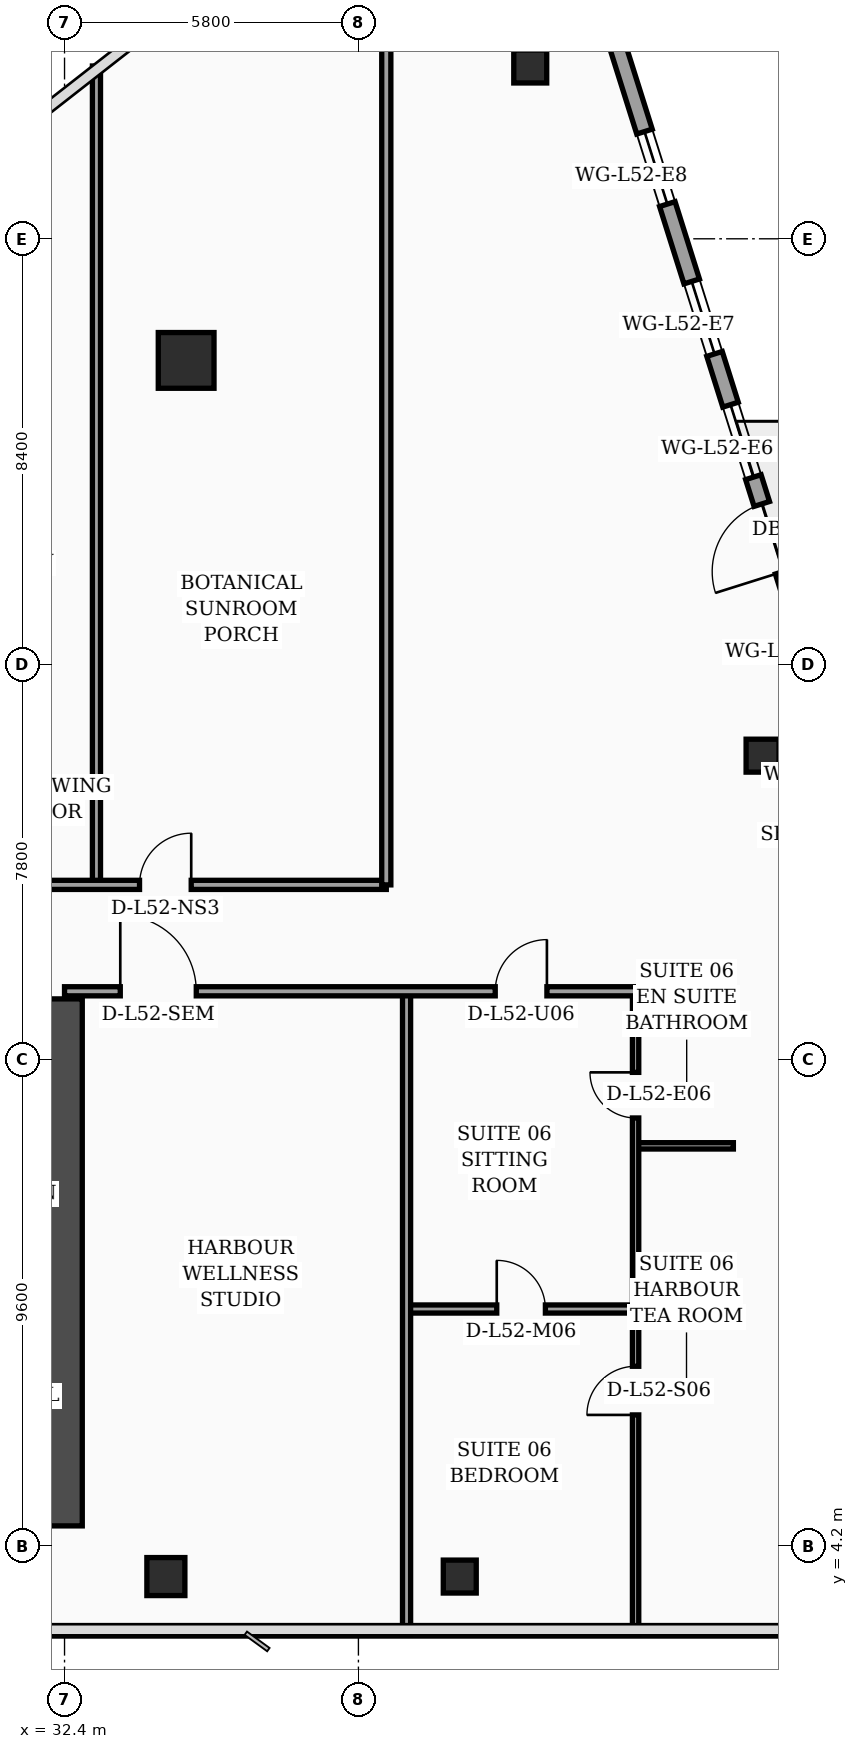
"""IFC4 building model, lengths in metres.
Left out: names, types, materials, properties, quantities, classifications, styles, units other than length and angle.
Written with IfcOpenShell. Run it as: python <this file> out.ifc"""

import sys

from ifc_helpers import new_model, si_unit, direction, frame, frame_2d, origin, origin_2d, place, context, subcontext, project, spatial, rectangle, hollow_rectangle, circle, extrude, element, fill, save


model = new_model("IFC4")
c1 = context("Model", 3, precision=1e-05, world=origin(), true_north=direction((0.0, 1.0)))
c2 = subcontext(c1, "Body", "Model", "MODEL_VIEW")
j1 = project(units=[si_unit("LENGTHUNIT", "METRE"), si_unit("PLANEANGLEUNIT", "RADIAN")], contexts=[c1])
p1 = place(None, origin())
s1 = spatial("IfcSite", under=j1, at=p1, CompositionType="ELEMENT")
p2 = place(p1, origin())
s2 = spatial("IfcBuilding", under=s1, at=p2, CompositionType="ELEMENT")
p3 = place(p2, frame((0.0, 0.0, 211.0)))
s3 = spatial("IfcBuildingStorey", under=s2, at=p3, CompositionType="ELEMENT", Elevation=211.0)
p4 = place(p3, frame((32.4, 4.6, 0.0), z_axis=(0.0, 0.0, 1.0), x_axis=(0.0, 1.0, 0.0)))
e1 = element("IfcWall", 1, at=p4, inside=s3, PredefinedType="SHEAR", context=c2, shape_type="SweptSolid", body=[
    extrude(rectangle(XDim=10.4, YDim=0.7, at=frame_2d((5.2, 0.0))), origin(), (0.0, 0.0, 1.0), 3.56),
])
p5 = place(p3, frame((34.4, 3.6, 0.0), z_axis=(0.0, 0.0, 1.0), x_axis=(1.0, 0.0, 0.0)))
e2 = element("IfcColumn", 2, at=p5, inside=s3, PredefinedType="COLUMN", context=c2, shape_type="SweptSolid", body=[
    extrude(hollow_rectangle(XDim=0.75, YDim=0.75, WallThickness=0.032, at=origin_2d()), origin(), (0.0, 0.0, 1.0), 3.56),
])
p6 = place(p3, frame((40.2, 3.6, 0.0), z_axis=(0.0, 0.0, 1.0), x_axis=(1.0, 0.0, 0.0)))
e3 = element("IfcColumn", 3, at=p6, inside=s3, PredefinedType="COLUMN", context=c2, shape_type="SweptSolid", body=[
    extrude(hollow_rectangle(XDim=0.65, YDim=0.65, WallThickness=0.028, at=origin_2d()), origin(), (0.0, 0.0, 1.0), 3.56),
])
p7 = place(p3, frame((34.8, 27.6, 0.0), z_axis=(0.0, 0.0, 1.0), x_axis=(1.0, 0.0, 0.0)))
e4 = element("IfcColumn", 4, at=p7, inside=s3, PredefinedType="COLUMN", context=c2, shape_type="SweptSolid", body=[
    extrude(circle(Radius=0.55, at=origin_2d()), origin(), (0.0, 0.0, 1.0), 3.56),
])
for number, where, z_axis, x_axis in (
    (5, (46.176, 19.8, 0.0), (0.0, 0.0, 1.0), (1.0, 0.0, 0.0)),
    (6, (41.591, 33.4, 0.0), (0.0, 0.0, 1.0), (1.0, 0.0, 0.0)),
):
    element("IfcColumn", number, at=place(p3, frame(where, z_axis=z_axis, x_axis=x_axis)), inside=s3, PredefinedType="COLUMN", context=c2, shape_type="SweptSolid", body=[
        extrude(hollow_rectangle(XDim=0.65, YDim=0.65, WallThickness=0.028, at=origin_2d()), origin(), (0.0, 0.0, 1.0), 3.56),
    ])
p8 = place(p3, frame((52.23, 5.505, 0.0), z_axis=(0.0, 0.0, 1.0), x_axis=(-0.300509063924, 0.953778958931, 0.0)))
e7 = element("IfcWall", 7, at=p8, inside=s3, PredefinedType="SOLIDWALL", context=c2, shape_type="SweptSolid", body=[
    extrude(rectangle(XDim=30.814, YDim=0.32, at=frame_2d((15.407, 0.0))), origin(), (0.0, 0.0, 1.0), 3.56),
])
p9 = place(p8, frame((18.796, 0.0, 0.0)))
e8 = element("IfcOpeningElement", 8, at=p9, cuts=e7, PredefinedType="OPENING", context=c2, shape_type="SweptSolid", body=[
    extrude(rectangle(XDim=1.4, YDim=2.25, at=frame_2d((0.7, 1.125))), frame((0.0, 0.17, 0.0), z_axis=(0.0, -1.0, 0.0), x_axis=(1.0, 0.0, 0.0)), (0.0, 0.0, 1.0), 0.34),
])
p10 = place(p8, frame((4.437, 0.0, 0.7)))
e9 = element("IfcOpeningElement", 9, at=p10, cuts=e7, PredefinedType="OPENING", context=c2, shape_type="SweptSolid", body=[
    extrude(rectangle(XDim=1.6, YDim=1.65, at=frame_2d((0.8, 0.825))), frame((0.0, 0.17, 0.0), z_axis=(0.0, -1.0, 0.0), x_axis=(1.0, 0.0, 0.0)), (0.0, 0.0, 1.0), 0.34),
])
p11 = place(p8, frame((9.889, 0.0, 0.7)))
e10 = element("IfcOpeningElement", 10, at=p11, cuts=e7, PredefinedType="OPENING", context=c2, shape_type="SweptSolid", body=[
    extrude(rectangle(XDim=1.6, YDim=1.65, at=frame_2d((0.8, 0.825))), frame((0.0, 0.17, 0.0), z_axis=(0.0, -1.0, 0.0), x_axis=(1.0, 0.0, 0.0)), (0.0, 0.0, 1.0), 0.34),
])
p12 = place(p8, frame((1.6, 0.0, 0.75)))
e11 = element("IfcOpeningElement", 11, at=p12, cuts=e7, PredefinedType="OPENING", context=c2, shape_type="SweptSolid", body=[
    extrude(rectangle(XDim=1.5, YDim=1.6, at=frame_2d((0.75, 0.8))), frame((0.0, 0.17, 0.0), z_axis=(0.0, -1.0, 0.0), x_axis=(1.0, 0.0, 0.0)), (0.0, 0.0, 1.0), 0.34),
])
p13 = place(p8, frame((7.8, 0.0, 0.75)))
e12 = element("IfcOpeningElement", 12, at=p13, cuts=e7, PredefinedType="OPENING", context=c2, shape_type="SweptSolid", body=[
    extrude(rectangle(XDim=1.5, YDim=1.6, at=frame_2d((0.75, 0.8))), frame((0.0, 0.17, 0.0), z_axis=(0.0, -1.0, 0.0), x_axis=(1.0, 0.0, 0.0)), (0.0, 0.0, 1.0), 0.34),
])
p14 = place(p8, frame((11.95, 0.0, 0.75)))
e13 = element("IfcOpeningElement", 13, at=p14, cuts=e7, PredefinedType="OPENING", context=c2, shape_type="SweptSolid", body=[
    extrude(rectangle(XDim=1.5, YDim=1.6, at=frame_2d((0.75, 0.8))), frame((0.0, 0.17, 0.0), z_axis=(0.0, -1.0, 0.0), x_axis=(1.0, 0.0, 0.0)), (0.0, 0.0, 1.0), 0.34),
])
p15 = place(p8, frame((14.0, 0.0, 0.75)))
e14 = element("IfcOpeningElement", 14, at=p15, cuts=e7, PredefinedType="OPENING", context=c2, shape_type="SweptSolid", body=[
    extrude(rectangle(XDim=1.5, YDim=1.6, at=frame_2d((0.75, 0.8))), frame((0.0, 0.17, 0.0), z_axis=(0.0, -1.0, 0.0), x_axis=(1.0, 0.0, 0.0)), (0.0, 0.0, 1.0), 0.34),
])
p16 = place(p8, frame((16.55, 0.0, 0.75)))
e15 = element("IfcOpeningElement", 15, at=p16, cuts=e7, PredefinedType="OPENING", context=c2, shape_type="SweptSolid", body=[
    extrude(rectangle(XDim=1.5, YDim=1.6, at=frame_2d((0.75, 0.8))), frame((0.0, 0.17, 0.0), z_axis=(0.0, -1.0, 0.0), x_axis=(1.0, 0.0, 0.0)), (0.0, 0.0, 1.0), 0.34),
])
p17 = place(p8, frame((20.75, 0.0, 0.75)))
e16 = element("IfcOpeningElement", 16, at=p17, cuts=e7, PredefinedType="OPENING", context=c2, shape_type="SweptSolid", body=[
    extrude(rectangle(XDim=1.5, YDim=1.6, at=frame_2d((0.75, 0.8))), frame((0.0, 0.17, 0.0), z_axis=(0.0, -1.0, 0.0), x_axis=(1.0, 0.0, 0.0)), (0.0, 0.0, 1.0), 0.34),
])
p18 = place(p8, frame((23.3, 0.0, 0.75)))
e17 = element("IfcOpeningElement", 17, at=p18, cuts=e7, PredefinedType="OPENING", context=c2, shape_type="SweptSolid", body=[
    extrude(rectangle(XDim=1.5, YDim=1.6, at=frame_2d((0.75, 0.8))), frame((0.0, 0.17, 0.0), z_axis=(0.0, -1.0, 0.0), x_axis=(1.0, 0.0, 0.0)), (0.0, 0.0, 1.0), 0.34),
])
p19 = place(p8, frame((26.4, 0.0, 0.75)))
e18 = element("IfcOpeningElement", 18, at=p19, cuts=e7, PredefinedType="OPENING", context=c2, shape_type="SweptSolid", body=[
    extrude(rectangle(XDim=1.5, YDim=1.6, at=frame_2d((0.75, 0.8))), frame((0.0, 0.17, 0.0), z_axis=(0.0, -1.0, 0.0), x_axis=(1.0, 0.0, 0.0)), (0.0, 0.0, 1.0), 0.34),
])
p20 = place(p3, frame((43.67, 12.1, 0.0), z_axis=(0.0, 0.0, 1.0), x_axis=(1.0, 0.0, 0.0)))
e19 = element("IfcWall", 19, at=p20, inside=s3, PredefinedType="PARTITIONING", context=c2, shape_type="SweptSolid", body=[
    extrude(rectangle(XDim=1.93, YDim=0.125, at=frame_2d((0.965, 0.0))), origin(), (0.0, 0.0, 1.0), 3.56),
])
p21 = place(p3, frame((39.15, 8.88, 0.0), z_axis=(0.0, 0.0, 1.0), x_axis=(1.0, 0.0, 0.0)))
e20 = element("IfcWall", 20, at=p21, inside=s3, PredefinedType="PARTITIONING", context=c2, shape_type="SweptSolid", body=[
    extrude(rectangle(XDim=4.52, YDim=0.16, at=frame_2d((2.26, 0.0))), origin(), (0.0, 0.0, 1.0), 3.09),
])
p22 = place(p21, frame((1.78, 0.0, 0.0)))
e21 = element("IfcOpeningElement", 21, at=p22, cuts=e20, PredefinedType="OPENING", context=c2, shape_type="SweptSolid", body=[
    extrude(rectangle(XDim=0.96, YDim=2.2, at=frame_2d((0.48, 1.1))), frame((0.0, 0.09, 0.0), z_axis=(0.0, -1.0, 0.0), x_axis=(1.0, 0.0, 0.0)), (0.0, 0.0, 1.0), 0.18),
])
p23 = place(p3, frame((43.67, 2.44, 0.0), z_axis=(0.0, 0.0, 1.0), x_axis=(0.0, 1.0, 0.0)))
e22 = element("IfcWall", 22, at=p23, inside=s3, PredefinedType="PARTITIONING", context=c2, shape_type="SweptSolid", body=[
    extrude(rectangle(XDim=12.71, YDim=0.125, at=frame_2d((6.355, 0.0))), origin(), (0.0, 0.0, 1.0), 3.09),
])
p24 = place(p23, frame((4.35, 0.0, 0.0)))
e23 = element("IfcOpeningElement", 23, at=p24, cuts=e22, PredefinedType="OPENING", context=c2, shape_type="SweptSolid", body=[
    extrude(rectangle(XDim=0.96, YDim=2.2, at=frame_2d((0.48, 1.1))), frame((0.0, 0.073, 0.0), z_axis=(0.0, -1.0, 0.0), x_axis=(1.0, 0.0, 0.0)), (0.0, 0.0, 1.0), 0.145),
])
p25 = place(p23, frame((10.21, 0.0, 0.0)))
e24 = element("IfcOpeningElement", 24, at=p25, cuts=e22, PredefinedType="OPENING", context=c2, shape_type="SweptSolid", body=[
    extrude(rectangle(XDim=0.9, YDim=2.15, at=frame_2d((0.45, 1.075))), frame((0.0, 0.073, 0.0), z_axis=(0.0, -1.0, 0.0), x_axis=(1.0, 0.0, 0.0)), (0.0, 0.0, 1.0), 0.145),
])
p26 = place(p3, frame((39.15, 2.44, 0.0), z_axis=(0.0, 0.0, 1.0), x_axis=(0.0, 1.0, 0.0)))
e25 = element("IfcWall", 25, at=p26, inside=s3, PredefinedType="PARTITIONING", context=c2, shape_type="SweptSolid", body=[
    extrude(rectangle(XDim=12.71, YDim=0.16, at=frame_2d((6.355, 0.0))), origin(), (0.0, 0.0, 1.0), 2.94),
])
p27 = place(p3, frame((32.4, 15.15, 0.0), z_axis=(0.0, 0.0, 1.0), x_axis=(1.0, 0.0, 0.0)))
e26 = element("IfcWall", 26, at=p27, inside=s3, PredefinedType="PARTITIONING", context=c2, shape_type="SweptSolid", body=[
    extrude(rectangle(XDim=13.2, YDim=0.18, at=frame_2d((6.6, 0.0))), origin(), (0.0, 0.0, 1.0), 2.94),
])
p28 = place(p27, frame((1.1, 0.0, 0.0)))
e27 = element("IfcOpeningElement", 27, at=p28, cuts=e26, PredefinedType="OPENING", context=c2, shape_type="SweptSolid", body=[
    extrude(rectangle(XDim=1.5, YDim=2.22, at=frame_2d((0.75, 1.11))), frame((0.0, 0.1, 0.0), z_axis=(0.0, -1.0, 0.0), x_axis=(1.0, 0.0, 0.0)), (0.0, 0.0, 1.0), 0.2),
])
p29 = place(p27, frame((8.5, 0.0, 0.0)))
e28 = element("IfcOpeningElement", 28, at=p29, cuts=e26, PredefinedType="OPENING", context=c2, shape_type="SweptSolid", body=[
    extrude(rectangle(XDim=1.02, YDim=2.2, at=frame_2d((0.51, 1.1))), frame((0.0, 0.1, 0.0), z_axis=(0.0, -1.0, 0.0), x_axis=(1.0, 0.0, 0.0)), (0.0, 0.0, 1.0), 0.2),
])
p30 = place(p3, frame((33.03, 17.25, 0.0), z_axis=(0.0, 0.0, 1.0), x_axis=(0.0, 1.0, 0.0)))
e29 = element("IfcWall", 29, at=p30, inside=s3, PredefinedType="PARTITIONING", context=c2, shape_type="SweptSolid", body=[
    extrude(rectangle(XDim=16.16, YDim=0.16, at=frame_2d((8.08, 0.0))), origin(), (0.0, 0.0, 1.0), 2.94),
])
p31 = place(p3, frame((21.5, 17.25, 0.0), z_axis=(0.0, 0.0, 1.0), x_axis=(1.0, 0.0, 0.0)))
e30 = element("IfcWall", 30, at=p31, inside=s3, PredefinedType="PARTITIONING", context=c2, shape_type="SweptSolid", body=[
    extrude(rectangle(XDim=17.25, YDim=0.18, at=frame_2d((8.625, 0.0))), origin(), (0.0, 0.0, 1.0), 2.94),
])
p32 = place(p31, frame((0.95, 0.0, 0.0)))
e31 = element("IfcOpeningElement", 31, at=p32, cuts=e30, PredefinedType="OPENING", context=c2, shape_type="SweptSolid", body=[
    extrude(rectangle(XDim=1.02, YDim=2.2, at=frame_2d((0.51, 1.1))), frame((0.0, 0.1, 0.0), z_axis=(0.0, -1.0, 0.0), x_axis=(1.0, 0.0, 0.0)), (0.0, 0.0, 1.0), 0.2),
])
p33 = place(p31, frame((7.32, 0.0, 0.0)))
e32 = element("IfcOpeningElement", 32, at=p33, cuts=e30, PredefinedType="OPENING", context=c2, shape_type="SweptSolid", body=[
    extrude(rectangle(XDim=1.02, YDim=2.2, at=frame_2d((0.51, 1.1))), frame((0.0, 0.1, 0.0), z_axis=(0.0, -1.0, 0.0), x_axis=(1.0, 0.0, 0.0)), (0.0, 0.0, 1.0), 0.2),
])
p34 = place(p31, frame((12.38, 0.0, 0.0)))
e33 = element("IfcOpeningElement", 33, at=p34, cuts=e30, PredefinedType="OPENING", context=c2, shape_type="SweptSolid", body=[
    extrude(rectangle(XDim=1.02, YDim=2.2, at=frame_2d((0.51, 1.1))), frame((0.0, 0.1, 0.0), z_axis=(0.0, -1.0, 0.0), x_axis=(1.0, 0.0, 0.0)), (0.0, 0.0, 1.0), 0.2),
])
p35 = place(p3, frame((38.75, 17.25, 0.0), z_axis=(0.0, 0.0, 1.0), x_axis=(0.0, 1.0, 0.0)))
e34 = element("IfcWall", 34, at=p35, inside=s3, PredefinedType="PARTITIONING", context=c2, shape_type="SweptSolid", body=[
    extrude(rectangle(XDim=20.63, YDim=0.18, at=frame_2d((10.315, 0.0))), origin(), (0.0, 0.0, 1.0), 2.94),
])
p36 = place(p9, origin())
e35 = element("IfcDoor", 35, at=p36, inside=s3, OperationType="SINGLE_SWING_LEFT", PredefinedType="DOOR", context=c2, shape_type="SweptSolid", body=[
    extrude(rectangle(XDim=1.4, YDim=2.25, at=frame_2d((0.7, 1.125))), frame((0.0, 0.025, 0.0), z_axis=(0.0, -1.0, 0.0), x_axis=(1.0, 0.0, 0.0)), (0.0, 0.0, 1.0), 0.05),
])
fill(e8, e35)
p37 = place(p17, origin())
e36 = element("IfcWindow", 36, at=p37, inside=s3, PartitioningType="SINGLE_PANEL", PredefinedType="WINDOW", context=c2, shape_type="SweptSolid", body=[
    extrude(rectangle(XDim=1.5, YDim=1.6, at=frame_2d((0.75, 0.8))), frame((0.0, 0.03, 0.0), z_axis=(0.0, -1.0, 0.0), x_axis=(1.0, 0.0, 0.0)), (0.0, 0.0, 1.0), 0.06),
])
fill(e16, e36)
p38 = place(p18, origin())
e37 = element("IfcWindow", 37, at=p38, inside=s3, PartitioningType="SINGLE_PANEL", PredefinedType="WINDOW", context=c2, shape_type="SweptSolid", body=[
    extrude(rectangle(XDim=1.5, YDim=1.6, at=frame_2d((0.75, 0.8))), frame((0.0, 0.03, 0.0), z_axis=(0.0, -1.0, 0.0), x_axis=(1.0, 0.0, 0.0)), (0.0, 0.0, 1.0), 0.06),
])
fill(e17, e37)
p39 = place(p19, origin())
e38 = element("IfcWindow", 38, at=p39, inside=s3, PartitioningType="SINGLE_PANEL", PredefinedType="WINDOW", context=c2, shape_type="SweptSolid", body=[
    extrude(rectangle(XDim=1.5, YDim=1.6, at=frame_2d((0.75, 0.8))), frame((0.0, 0.03, 0.0), z_axis=(0.0, -1.0, 0.0), x_axis=(1.0, 0.0, 0.0)), (0.0, 0.0, 1.0), 0.06),
])
fill(e18, e38)
p40 = place(p22, origin())
e39 = element("IfcDoor", 39, at=p40, inside=s3, OperationType="SINGLE_SWING_LEFT", PredefinedType="DOOR", context=c2, shape_type="SweptSolid", body=[
    extrude(rectangle(XDim=0.96, YDim=2.2, at=frame_2d((0.48, 1.1))), frame((0.0, 0.025, 0.0), z_axis=(0.0, -1.0, 0.0), x_axis=(1.0, 0.0, 0.0)), (0.0, 0.0, 1.0), 0.05),
])
fill(e21, e39)
p41 = place(p24, origin())
e40 = element("IfcDoor", 40, at=p41, inside=s3, OperationType="SINGLE_SWING_LEFT", PredefinedType="DOOR", context=c2, shape_type="SweptSolid", body=[
    extrude(rectangle(XDim=0.96, YDim=2.2, at=frame_2d((0.48, 1.1))), frame((0.0, 0.025, 0.0), z_axis=(0.0, -1.0, 0.0), x_axis=(1.0, 0.0, 0.0)), (0.0, 0.0, 1.0), 0.05),
])
fill(e23, e40)
p42 = place(p25, origin())
e41 = element("IfcDoor", 41, at=p42, inside=s3, OperationType="SINGLE_SWING_RIGHT", PredefinedType="DOOR", context=c2, shape_type="SweptSolid", body=[
    extrude(rectangle(XDim=0.9, YDim=2.15, at=frame_2d((0.45, 1.075))), frame((0.0, 0.025, 0.0), z_axis=(0.0, -1.0, 0.0), x_axis=(1.0, 0.0, 0.0)), (0.0, 0.0, 1.0), 0.05),
])
fill(e24, e41)
p43 = place(p28, origin())
e42 = element("IfcDoor", 42, at=p43, inside=s3, OperationType="SINGLE_SWING_LEFT", PredefinedType="DOOR", context=c2, shape_type="SweptSolid", body=[
    extrude(rectangle(XDim=1.5, YDim=2.22, at=frame_2d((0.75, 1.11))), frame((0.0, 0.025, 0.0), z_axis=(0.0, -1.0, 0.0), x_axis=(1.0, 0.0, 0.0)), (0.0, 0.0, 1.0), 0.05),
])
fill(e27, e42)
p44 = place(p29, origin())
e43 = element("IfcDoor", 43, at=p44, inside=s3, OperationType="SINGLE_SWING_RIGHT", PredefinedType="DOOR", context=c2, shape_type="SweptSolid", body=[
    extrude(rectangle(XDim=1.02, YDim=2.2, at=frame_2d((0.51, 1.1))), frame((0.0, 0.025, 0.0), z_axis=(0.0, -1.0, 0.0), x_axis=(1.0, 0.0, 0.0)), (0.0, 0.0, 1.0), 0.05),
])
fill(e28, e43)
p45 = place(p34, origin())
e44 = element("IfcDoor", 44, at=p45, inside=s3, OperationType="SINGLE_SWING_RIGHT", PredefinedType="DOOR", context=c2, shape_type="SweptSolid", body=[
    extrude(rectangle(XDim=1.02, YDim=2.2, at=frame_2d((0.51, 1.1))), frame((0.0, 0.025, 0.0), z_axis=(0.0, -1.0, 0.0), x_axis=(1.0, 0.0, 0.0)), (0.0, 0.0, 1.0), 0.05),
])
fill(e33, e44)
save(model, sys.argv[1])
